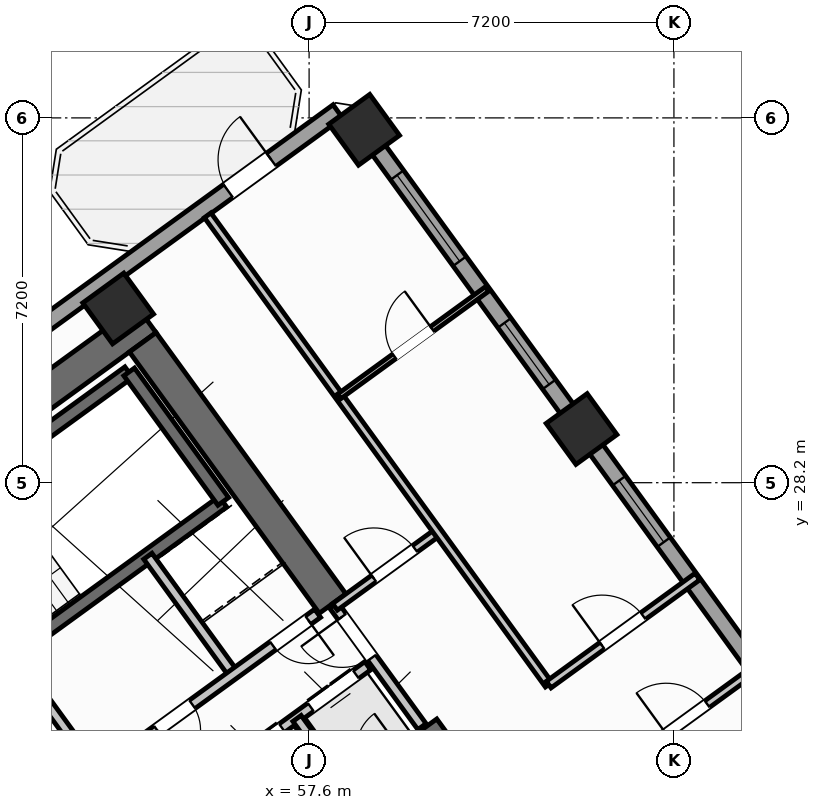
"""IFC4 building model, lengths in metres.
Left out: names, types, materials, properties, quantities, classifications, styles, units other than length and angle.
Written with IfcOpenShell. Run it as: python <this file> out.ifc"""

import sys

from ifc_helpers import new_model, si_unit, direction, frame, frame_2d, origin, origin_2d, place, context, subcontext, project, spatial, rectangle, hollow_rectangle, extrude, source, transform, mapped, element, fill, save


model = new_model("IFC4")
c1 = context("Model", 3, precision=1e-05, world=origin(), true_north=direction((0.0, 1.0)))
c2 = subcontext(c1, "Body", "Model", "MODEL_VIEW")
j1 = project(units=[si_unit("LENGTHUNIT", "METRE"), si_unit("PLANEANGLEUNIT", "RADIAN")], contexts=[c1])
p1 = place(None, origin())
s1 = spatial("IfcSite", under=j1, at=p1, CompositionType="ELEMENT")
p2 = place(p1, origin())
s2 = spatial("IfcBuilding", under=s1, at=p2, CompositionType="ELEMENT")
p3 = place(p2, frame((0.0, 0.0, 45.6)))
s3 = spatial("IfcBuildingStorey", under=s2, at=p3, CompositionType="ELEMENT", Elevation=45.6)
p4 = place(p3, frame((44.325, 24.113, 0.0), z_axis=(0.0, 0.0, 1.0), x_axis=(0.809012664862, 0.58779121131, 0.0)))
e1 = element("IfcWall", 1, at=p4, inside=s3, PredefinedType="SHEAR", context=c2, shape_type="SweptSolid", body=[
    extrude(rectangle(XDim=12.44, YDim=0.65, at=frame_2d((6.22, 0.0))), origin(), (0.0, 0.0, 1.0), 3.35),
])
p5 = place(p3, frame((61.929, 20.494, 0.0), z_axis=(0.0, 0.0, 1.0), x_axis=(-0.58782982593, 0.808984607855, 0.0)))
e2 = element("IfcWall", 2, at=p5, inside=s3, PredefinedType="SHEAR", context=c2, shape_type="SweptSolid", body=[
    extrude(rectangle(XDim=3.525, YDim=0.65, at=frame_2d((1.762, 0.0))), origin(), (0.0, 0.0, 1.0), 3.35),
])
p6 = place(p3, frame((58.064, 25.813, 0.0), z_axis=(0.0, 0.0, 1.0), x_axis=(-0.58777996584, 0.809020835181, 0.0)))
e3 = element("IfcWall", 3, at=p6, inside=s3, PredefinedType="SHEAR", context=c2, shape_type="SweptSolid", body=[
    extrude(rectangle(XDim=6.375, YDim=0.65, at=frame_2d((3.188, 0.0))), origin(), (0.0, 0.0, 1.0), 3.35),
])
m1 = source(origin(), c2, "Body", "SweptSolid", [
    extrude(hollow_rectangle(XDim=1.0, YDim=1.0, WallThickness=0.04, at=origin_2d()), origin(), (0.0, 0.0, 1.0), 3.6),
])
for number, where, z_axis, x_axis in (
    (4, (53.832, 31.638, 0.0), (0.0, 0.0, 1.0), (0.809, 0.588, 0.0)),
    (5, (62.977, 29.259, 0.0), (0.0, 0.0, 1.0), (0.809, 0.588, 0.0)),
    (6, (58.686, 35.165, 0.0), (0.0, 0.0, 1.0), (0.809, 0.588, 0.0)),
):
    element("IfcColumn", number, at=place(p3, frame(where, z_axis=z_axis, x_axis=x_axis)), inside=s3, PredefinedType="COLUMN", context=c2, shape_type="MappedRepresentation", body=[
        mapped(m1, transform((0.0, 0.0, 0.0), scale=1.0)),
    ])
p7 = place(p3, frame((43.938, 25.192, 0.0), z_axis=(0.0, 0.0, 1.0), x_axis=(0.809016324578, 0.587786174187, 0.0)))
e7 = element("IfcWall", 7, at=p7, inside=s3, PredefinedType="STANDARD", context=c2, shape_type="SweptSolid", body=[
    extrude(rectangle(XDim=17.587, YDim=0.32, at=frame_2d((8.794, 0.0))), origin(), (0.0, 0.0, 1.0), 3.35),
])
p8 = place(p7, frame((14.914, 0.0, 0.0)))
e8 = element("IfcOpeningElement", 8, at=p8, cuts=e7, PredefinedType="OPENING", context=c2, shape_type="SweptSolid", body=[
    extrude(rectangle(XDim=1.05, YDim=2.15, at=frame_2d((0.525, 1.075))), frame((0.0, 0.17, 0.0), z_axis=(0.0, -1.0, 0.0), x_axis=(1.0, 0.0, 0.0)), (0.0, 0.0, 1.0), 0.34),
])
p9 = place(p7, frame((2.169, 0.0, 0.8)))
e9 = element("IfcOpeningElement", 9, at=p9, cuts=e7, PredefinedType="OPENING", context=c2, shape_type="SweptSolid", body=[
    extrude(rectangle(XDim=2.1, YDim=1.55, at=frame_2d((1.05, 0.775))), frame((0.0, 0.17, 0.0), z_axis=(0.0, -1.0, 0.0), x_axis=(1.0, 0.0, 0.0)), (0.0, 0.0, 1.0), 0.34),
])
p10 = place(p7, frame((7.319, 0.0, 0.8)))
e10 = element("IfcOpeningElement", 10, at=p10, cuts=e7, PredefinedType="OPENING", context=c2, shape_type="SweptSolid", body=[
    extrude(rectangle(XDim=2.1, YDim=1.55, at=frame_2d((1.05, 0.775))), frame((0.0, 0.17, 0.0), z_axis=(0.0, -1.0, 0.0), x_axis=(1.0, 0.0, 0.0)), (0.0, 0.0, 1.0), 0.34),
])
p11 = place(p3, frame((58.455, 35.484, 0.0), z_axis=(0.0, 0.0, 1.0), x_axis=(0.587783625747, -0.809018176127, 0.0)))
e11 = element("IfcWall", 11, at=p11, inside=s3, PredefinedType="STANDARD", context=c2, shape_type="SweptSolid", body=[
    extrude(rectangle(XDim=21.587, YDim=0.32, at=frame_2d((10.794, 0.0))), origin(), (0.0, 0.0, 1.0), 2.725),
])
p12 = place(p11, frame((1.5, 0.0, 0.8)))
e12 = element("IfcOpeningElement", 12, at=p12, cuts=e11, PredefinedType="OPENING", context=c2, shape_type="SweptSolid", body=[
    extrude(rectangle(XDim=2.1, YDim=1.55, at=frame_2d((1.05, 0.775))), frame((0.0, 0.17, 0.0), z_axis=(0.0, -1.0, 0.0), x_axis=(1.0, 0.0, 0.0)), (0.0, 0.0, 1.0), 0.34),
])
p13 = place(p11, frame((5.105, 0.0, 0.85)))
e13 = element("IfcOpeningElement", 13, at=p13, cuts=e11, PredefinedType="OPENING", context=c2, shape_type="SweptSolid", body=[
    extrude(rectangle(XDim=1.5, YDim=1.5, at=frame_2d((0.75, 0.75))), frame((0.0, 0.17, 0.0), z_axis=(0.0, -1.0, 0.0), x_axis=(1.0, 0.0, 0.0)), (0.0, 0.0, 1.0), 0.34),
])
p14 = place(p11, frame((8.954, 0.0, 0.85)))
e14 = element("IfcOpeningElement", 14, at=p14, cuts=e11, PredefinedType="OPENING", context=c2, shape_type="SweptSolid", body=[
    extrude(rectangle(XDim=1.5, YDim=1.5, at=frame_2d((0.75, 0.75))), frame((0.0, 0.17, 0.0), z_axis=(0.0, -1.0, 0.0), x_axis=(1.0, 0.0, 0.0)), (0.0, 0.0, 1.0), 0.34),
])
p15 = place(p11, frame((17.581, 0.0, 0.95)))
e15 = element("IfcOpeningElement", 15, at=p15, cuts=e11, PredefinedType="OPENING", context=c2, shape_type="SweptSolid", body=[
    extrude(rectangle(XDim=1.2, YDim=1.4, at=frame_2d((0.6, 0.7))), frame((0.0, 0.17, 0.0), z_axis=(0.0, -1.0, 0.0), x_axis=(1.0, 0.0, 0.0)), (0.0, 0.0, 1.0), 0.34),
])
p16 = place(p3, frame((48.006, 25.996, 0.0), z_axis=(0.0, 0.0, 1.0), x_axis=(0.80901903764, 0.587782439969, 0.0)))
e16 = element("IfcWall", 16, at=p16, inside=s3, PredefinedType="SHEAR", context=c2, shape_type="SweptSolid", body=[
    extrude(rectangle(XDim=7.46, YDim=0.26, at=frame_2d((3.73, 0.0))), origin(), (0.0, 0.0, 1.0), 3.35),
])
p17 = place(p3, frame((49.863, 23.44, 0.0), z_axis=(0.0, 0.0, 1.0), x_axis=(0.809003474932, 0.587803859759, 0.0)))
e17 = element("IfcWall", 17, at=p17, inside=s3, PredefinedType="SHEAR", context=c2, shape_type="SweptSolid", body=[
    extrude(rectangle(XDim=7.46, YDim=0.26, at=frame_2d((3.73, 0.0))), origin(), (0.0, 0.0, 1.0), 3.35),
])
p18 = place(p17, frame((0.36, 0.0, 0.0)))
e18 = element("IfcOpeningElement", 18, at=p18, cuts=e17, PredefinedType="OPENING", context=c2, shape_type="SweptSolid", body=[
    extrude(rectangle(XDim=0.86, YDim=2.05, at=frame_2d((0.43, 1.025))), frame((0.0, 0.14, 0.0), z_axis=(0.0, -1.0, 0.0), x_axis=(1.0, 0.0, 0.0)), (0.0, 0.0, 1.0), 0.28),
])
p19 = place(p3, frame((55.906, 27.831, 0.0), z_axis=(0.0, 0.0, 1.0), x_axis=(-0.587804123638, 0.809003283204, 0.0)))
e19 = element("IfcWall", 19, at=p19, inside=s3, PredefinedType="SHEAR", context=c2, shape_type="SweptSolid", body=[
    extrude(rectangle(XDim=3.16, YDim=0.26, at=frame_2d((1.58, 0.0))), origin(), (0.0, 0.0, 1.0), 3.35),
])
p20 = place(p3, frame((54.421, 21.436, 0.0), z_axis=(0.0, 0.0, 1.0), x_axis=(0.809013710463, 0.587789772183, 0.0)))
e20 = element("IfcWall", 20, at=p20, inside=s3, PredefinedType="STANDARD", context=c2, shape_type="SweptSolid", body=[
    extrude(rectangle(XDim=5.36, YDim=0.2, at=frame_2d((2.68, 0.0))), origin(), (0.0, 0.0, 1.0), 3.34),
])
p21 = place(p20, frame((0.37, 0.0, 0.0)))
e21 = element("IfcOpeningElement", 21, at=p21, cuts=e20, PredefinedType="OPENING", context=c2, shape_type="SweptSolid", body=[
    extrude(rectangle(XDim=1.1, YDim=2.15, at=frame_2d((0.55, 1.075))), frame((0.0, 0.11, 0.0), z_axis=(0.0, -1.0, 0.0), x_axis=(1.0, 0.0, 0.0)), (0.0, 0.0, 1.0), 0.22),
])
p22 = place(p20, frame((2.17, 0.0, 0.0)))
e22 = element("IfcOpeningElement", 22, at=p22, cuts=e20, PredefinedType="OPENING", context=c2, shape_type="SweptSolid", body=[
    extrude(rectangle(XDim=1.1, YDim=2.15, at=frame_2d((0.55, 1.075))), frame((0.0, 0.11, 0.0), z_axis=(0.0, -1.0, 0.0), x_axis=(1.0, 0.0, 0.0)), (0.0, 0.0, 1.0), 0.22),
])
p23 = place(p20, frame((3.97, 0.0, 0.0)))
e23 = element("IfcOpeningElement", 23, at=p23, cuts=e20, PredefinedType="OPENING", context=c2, shape_type="SweptSolid", body=[
    extrude(rectangle(XDim=1.1, YDim=2.15, at=frame_2d((0.55, 1.075))), frame((0.0, 0.11, 0.0), z_axis=(0.0, -1.0, 0.0), x_axis=(1.0, 0.0, 0.0)), (0.0, 0.0, 1.0), 0.22),
])
p24 = place(p3, frame((58.29, 22.27, 0.0), z_axis=(0.0, 0.0, 1.0), x_axis=(-0.587840865826, 0.808976585857, 0.0)))
e24 = element("IfcWall", 24, at=p24, inside=s3, PredefinedType="STANDARD", context=c2, shape_type="SweptSolid", body=[
    extrude(rectangle(XDim=1.58, YDim=0.2, at=frame_2d((0.79, 0.0))), origin(), (0.0, 0.0, 1.0), 3.34),
])
p25 = place(p3, frame((53.425, 22.468, 0.0), z_axis=(0.0, 0.0, 1.0), x_axis=(-0.5877230039, 0.809062216821, 0.0)))
e25 = element("IfcWall", 25, at=p25, inside=s3, PredefinedType="STANDARD", context=c2, shape_type="SweptSolid", body=[
    extrude(rectangle(XDim=2.88, YDim=0.2, at=frame_2d((1.44, 0.0))), origin(), (0.0, 0.0, 1.0), 3.34),
])
p26 = place(p3, frame((56.111, 24.419, 0.0), z_axis=(0.0, 0.0, 1.0), x_axis=(-0.58777848983, 0.809021907548, 0.0)))
e26 = element("IfcWall", 26, at=p26, inside=s3, PredefinedType="STANDARD", context=c2, shape_type="SweptSolid", body=[
    extrude(rectangle(XDim=2.88, YDim=0.2, at=frame_2d((1.44, 0.0))), origin(), (0.0, 0.0, 1.0), 3.34),
])
p27 = place(p3, frame((53.425, 22.468, 0.0), z_axis=(0.0, 0.0, 1.0), x_axis=(0.80902705128, 0.587771409902, 0.0)))
e27 = element("IfcWall", 27, at=p27, inside=s3, PredefinedType="STANDARD", context=c2, shape_type="SweptSolid", body=[
    extrude(rectangle(XDim=5.368, YDim=0.2, at=frame_2d((2.684, 0.0))), origin(), (0.0, 0.0, 1.0), 3.34),
])
p28 = place(p27, frame((4.28, 0.0, 0.0)))
e28 = element("IfcOpeningElement", 28, at=p28, cuts=e27, PredefinedType="OPENING", context=c2, shape_type="SweptSolid", body=[
    extrude(rectangle(XDim=0.86, YDim=2.05, at=frame_2d((0.43, 1.025))), frame((0.0, 0.11, 0.0), z_axis=(0.0, -1.0, 0.0), x_axis=(1.0, 0.0, 0.0)), (0.0, 0.0, 1.0), 0.22),
])
p29 = place(p27, frame((1.45, 0.0, 0.0)))
e29 = element("IfcOpeningElement", 29, at=p29, cuts=e27, PredefinedType="OPENING", context=c2, shape_type="SweptSolid", body=[
    extrude(rectangle(XDim=0.86, YDim=2.05, at=frame_2d((0.43, 1.025))), frame((0.0, 0.11, 0.0), z_axis=(0.0, -1.0, 0.0), x_axis=(1.0, 0.0, 0.0)), (0.0, 0.0, 1.0), 0.22),
])
p30 = place(p3, frame((59.827, 23.386, 0.0), z_axis=(0.0, 0.0, 1.0), x_axis=(-0.587803840107, 0.809003489211, 0.0)))
e30 = element("IfcWall", 30, at=p30, inside=s3, PredefinedType="STANDARD", context=c2, shape_type="SweptSolid", body=[
    extrude(rectangle(XDim=2.96, YDim=0.2, at=frame_2d((1.48, 0.0))), origin(), (0.0, 0.0, 1.0), 3.34),
])
p31 = place(p30, frame((1.68, 0.0, 0.0)))
e31 = element("IfcOpeningElement", 31, at=p31, cuts=e30, PredefinedType="OPENING", context=c2, shape_type="SweptSolid", body=[
    extrude(rectangle(XDim=1.0, YDim=2.1, at=frame_2d((0.5, 1.05))), frame((0.0, 0.11, 0.0), z_axis=(0.0, -1.0, 0.0), x_axis=(1.0, 0.0, 0.0)), (0.0, 0.0, 1.0), 0.22),
])
p32 = place(p3, frame((58.111, 25.749, 0.0), z_axis=(0.0, 0.0, 1.0), x_axis=(0.809000999347, 0.58780726693, 0.0)))
e32 = element("IfcWall", 32, at=p32, inside=s3, PredefinedType="PARTITIONING", context=c2, shape_type="SweptSolid", body=[
    extrude(rectangle(XDim=2.51, YDim=0.16, at=frame_2d((1.255, 0.0))), origin(), (0.0, 0.0, 1.0), 2.725),
])
p33 = place(p32, frame((0.95, 0.0, 0.0)))
e33 = element("IfcOpeningElement", 33, at=p33, cuts=e32, PredefinedType="OPENING", context=c2, shape_type="SweptSolid", body=[
    extrude(rectangle(XDim=1.0, YDim=2.1, at=frame_2d((0.5, 1.05))), frame((0.0, 0.09, 0.0), z_axis=(0.0, -1.0, 0.0), x_axis=(1.0, 0.0, 0.0)), (0.0, 0.0, 1.0), 0.18),
])
p34 = place(p3, frame((62.328, 24.215, 0.0), z_axis=(0.0, 0.0, 1.0), x_axis=(-0.587778600963, 0.809021826807, 0.0)))
e34 = element("IfcWall", 34, at=p34, inside=s3, PredefinedType="PARTITIONING", context=c2, shape_type="SweptSolid", body=[
    extrude(rectangle(XDim=11.45, YDim=0.16, at=frame_2d((5.725, 0.0))), origin(), (0.0, 0.0, 1.0), 3.34),
])
p35 = place(p3, frame((63.592, 22.475, 0.0), z_axis=(0.0, 0.0, 1.0), x_axis=(0.809035546126, 0.58775971715, 0.0)))
e35 = element("IfcWall", 35, at=p35, inside=s3, PredefinedType="PARTITIONING", context=c2, shape_type="SweptSolid", body=[
    extrude(rectangle(XDim=3.63, YDim=0.16, at=frame_2d((1.815, 0.0))), origin(), (0.0, 0.0, 1.0), 3.34),
])
p36 = place(p35, frame((1.305, 0.0, 0.0)))
e36 = element("IfcOpeningElement", 36, at=p36, cuts=e35, PredefinedType="OPENING", context=c2, shape_type="SweptSolid", body=[
    extrude(rectangle(XDim=1.0, YDim=2.1, at=frame_2d((0.5, 1.05))), frame((0.0, 0.09, 0.0), z_axis=(0.0, -1.0, 0.0), x_axis=(1.0, 0.0, 0.0)), (0.0, 0.0, 1.0), 0.18),
])
p37 = place(p3, frame((62.328, 24.215, 0.0), z_axis=(0.0, 0.0, 1.0), x_axis=(0.809003564202, 0.587803736896, 0.0)))
e37 = element("IfcWall", 37, at=p37, inside=s3, PredefinedType="PARTITIONING", context=c2, shape_type="SweptSolid", body=[
    extrude(rectangle(XDim=3.63, YDim=0.16, at=frame_2d((1.815, 0.0))), origin(), (0.0, 0.0, 1.0), 3.34),
])
p38 = place(p37, frame((1.305, 0.0, 0.0)))
e38 = element("IfcOpeningElement", 38, at=p38, cuts=e37, PredefinedType="OPENING", context=c2, shape_type="SweptSolid", body=[
    extrude(rectangle(XDim=1.0, YDim=2.1, at=frame_2d((0.5, 1.05))), frame((0.0, 0.09, 0.0), z_axis=(0.0, -1.0, 0.0), x_axis=(1.0, 0.0, 0.0)), (0.0, 0.0, 1.0), 0.18),
])
p39 = place(p3, frame((58.195, 29.904, 0.0), z_axis=(0.0, 0.0, 1.0), x_axis=(0.809005039917, 0.58780170584, 0.0)))
e39 = element("IfcWall", 39, at=p39, inside=s3, PredefinedType="PARTITIONING", context=c2, shape_type="SweptSolid", body=[
    extrude(rectangle(XDim=3.61, YDim=0.11, at=frame_2d((1.805, 0.0))), origin(), (0.0, 0.0, 1.0), 3.34),
])
p40 = place(p39, frame((1.345, 0.0, 0.0)))
e40 = element("IfcOpeningElement", 40, at=p40, cuts=e39, PredefinedType="OPENING", context=c2, shape_type="SweptSolid", body=[
    extrude(rectangle(XDim=0.92, YDim=2.08, at=frame_2d((0.46, 1.04))), frame((0.0, 0.065, 0.0), z_axis=(0.0, -1.0, 0.0), x_axis=(1.0, 0.0, 0.0)), (0.0, 0.0, 1.0), 0.13),
])
m2 = source(origin(), c2, "Body", "SweptSolid", [
    extrude(rectangle(XDim=1.05, YDim=2.15, at=frame_2d((0.525, 1.075))), frame((0.0, 0.025, 0.0), z_axis=(0.0, -1.0, 0.0), x_axis=(1.0, 0.0, 0.0)), (0.0, 0.0, 1.0), 0.05),
])
p41 = place(p8, origin())
e41 = element("IfcDoor", 41, at=p41, inside=s3, OperationType="SINGLE_SWING_RIGHT", PredefinedType="DOOR", context=c2, shape_type="MappedRepresentation", body=[
    mapped(m2, transform((0.0, 0.0, 0.0), scale=1.0)),
])
fill(e8, e41)
m3 = source(origin(), c2, "Body", "SweptSolid", [
    extrude(rectangle(XDim=2.1, YDim=1.55, at=frame_2d((1.05, 0.775))), frame((0.0, 0.03, 0.0), z_axis=(0.0, -1.0, 0.0), x_axis=(1.0, 0.0, 0.0)), (0.0, 0.0, 1.0), 0.06),
])
p42 = place(p12, origin())
e42 = element("IfcWindow", 42, at=p42, inside=s3, PartitioningType="SINGLE_PANEL", PredefinedType="WINDOW", context=c2, shape_type="MappedRepresentation", body=[
    mapped(m3, transform((0.0, 0.0, 0.0), scale=1.0)),
])
fill(e12, e42)
m4 = source(origin(), c2, "Body", "SweptSolid", [
    extrude(rectangle(XDim=1.5, YDim=1.5, at=frame_2d((0.75, 0.75))), frame((0.0, 0.03, 0.0), z_axis=(0.0, -1.0, 0.0), x_axis=(1.0, 0.0, 0.0)), (0.0, 0.0, 1.0), 0.06),
])
p43 = place(p13, origin())
e43 = element("IfcWindow", 43, at=p43, inside=s3, PartitioningType="SINGLE_PANEL", PredefinedType="WINDOW", context=c2, shape_type="MappedRepresentation", body=[
    mapped(m4, transform((0.0, 0.0, 0.0), scale=1.0)),
])
fill(e13, e43)
p44 = place(p14, origin())
e44 = element("IfcWindow", 44, at=p44, inside=s3, PartitioningType="SINGLE_PANEL", PredefinedType="WINDOW", context=c2, shape_type="MappedRepresentation", body=[
    mapped(m4, transform((0.0, 0.0, 0.0), scale=1.0)),
])
fill(e14, e44)
m5 = source(origin(), c2, "Body", "SweptSolid", [
    extrude(rectangle(XDim=1.1, YDim=2.15, at=frame_2d((0.55, 1.075))), frame((0.0, 0.025, 0.0), z_axis=(0.0, -1.0, 0.0), x_axis=(1.0, 0.0, 0.0)), (0.0, 0.0, 1.0), 0.05),
])
p45 = place(p22, origin())
e45 = element("IfcDoor", 45, at=p45, inside=s3, OperationType="DOUBLE_DOOR_SLIDING", PredefinedType="DOOR", context=c2, shape_type="MappedRepresentation", body=[
    mapped(m5, transform((0.0, 0.0, 0.0), scale=1.0)),
])
fill(e22, e45)
p46 = place(p23, origin())
e46 = element("IfcDoor", 46, at=p46, inside=s3, OperationType="DOUBLE_DOOR_SLIDING", PredefinedType="DOOR", context=c2, shape_type="MappedRepresentation", body=[
    mapped(m5, transform((0.0, 0.0, 0.0), scale=1.0)),
])
fill(e23, e46)
m6 = source(origin(), c2, "Body", "SweptSolid", [
    extrude(rectangle(XDim=0.86, YDim=2.05, at=frame_2d((0.43, 1.025))), frame((0.0, 0.025, 0.0), z_axis=(0.0, -1.0, 0.0), x_axis=(1.0, 0.0, 0.0)), (0.0, 0.0, 1.0), 0.05),
])
p47 = place(p28, frame((0.86, 0.0, 0.0), z_axis=(0.0, 0.0, 1.0), x_axis=(-1.0, 0.0, 0.0)))
e47 = element("IfcDoor", 47, at=p47, inside=s3, OperationType="SINGLE_SWING_LEFT", PredefinedType="DOOR", context=c2, shape_type="MappedRepresentation", body=[
    mapped(m6, transform((0.0, 0.0, 0.0), scale=1.0)),
])
fill(e28, e47)
p48 = place(p29, frame((0.86, 0.0, 0.0), z_axis=(0.0, 0.0, 1.0), x_axis=(-1.0, 0.0, 0.0)))
e48 = element("IfcDoor", 48, at=p48, inside=s3, OperationType="SINGLE_SWING_RIGHT", PredefinedType="DOOR", context=c2, shape_type="MappedRepresentation", body=[
    mapped(m6, transform((0.0, 0.0, 0.0), scale=1.0)),
])
fill(e29, e48)
m7 = source(origin(), c2, "Body", "SweptSolid", [
    extrude(rectangle(XDim=1.0, YDim=2.1, at=frame_2d((0.5, 1.05))), frame((0.0, 0.025, 0.0), z_axis=(0.0, -1.0, 0.0), x_axis=(1.0, 0.0, 0.0)), (0.0, 0.0, 1.0), 0.05),
])
p49 = place(p33, origin())
e49 = element("IfcDoor", 49, at=p49, inside=s3, OperationType="SINGLE_SWING_LEFT", PredefinedType="DOOR", context=c2, shape_type="MappedRepresentation", body=[
    mapped(m7, transform((0.0, 0.0, 0.0), scale=1.0)),
])
fill(e33, e49)
p50 = place(p31, origin())
e50 = element("IfcDoor", 50, at=p50, inside=s3, OperationType="SINGLE_SWING_RIGHT", PredefinedType="DOOR", context=c2, shape_type="MappedRepresentation", body=[
    mapped(m7, transform((0.0, 0.0, 0.0), scale=1.0)),
])
fill(e31, e50)
p51 = place(p38, origin())
e51 = element("IfcDoor", 51, at=p51, inside=s3, OperationType="SINGLE_SWING_LEFT", PredefinedType="DOOR", context=c2, shape_type="MappedRepresentation", body=[
    mapped(m7, transform((0.0, 0.0, 0.0), scale=1.0)),
])
fill(e38, e51)
m8 = source(origin(), c2, "Body", "SweptSolid", [
    extrude(rectangle(XDim=0.92, YDim=2.08, at=frame_2d((0.46, 1.04))), frame((0.0, 0.025, 0.0), z_axis=(0.0, -1.0, 0.0), x_axis=(1.0, 0.0, 0.0)), (0.0, 0.0, 1.0), 0.05),
])
p52 = place(p40, origin())
e52 = element("IfcDoor", 52, at=p52, inside=s3, OperationType="SINGLE_SWING_RIGHT", PredefinedType="DOOR", context=c2, shape_type="MappedRepresentation", body=[
    mapped(m8, transform((0.0, 0.0, 0.0), scale=1.0)),
])
fill(e40, e52)
p53 = place(p36, origin())
e53 = element("IfcDoor", 53, at=p53, inside=s3, OperationType="SINGLE_SWING_LEFT", PredefinedType="DOOR", context=c2, shape_type="MappedRepresentation", body=[
    mapped(m7, transform((0.0, 0.0, 0.0), scale=1.0)),
])
fill(e36, e53)
save(model, sys.argv[1])
